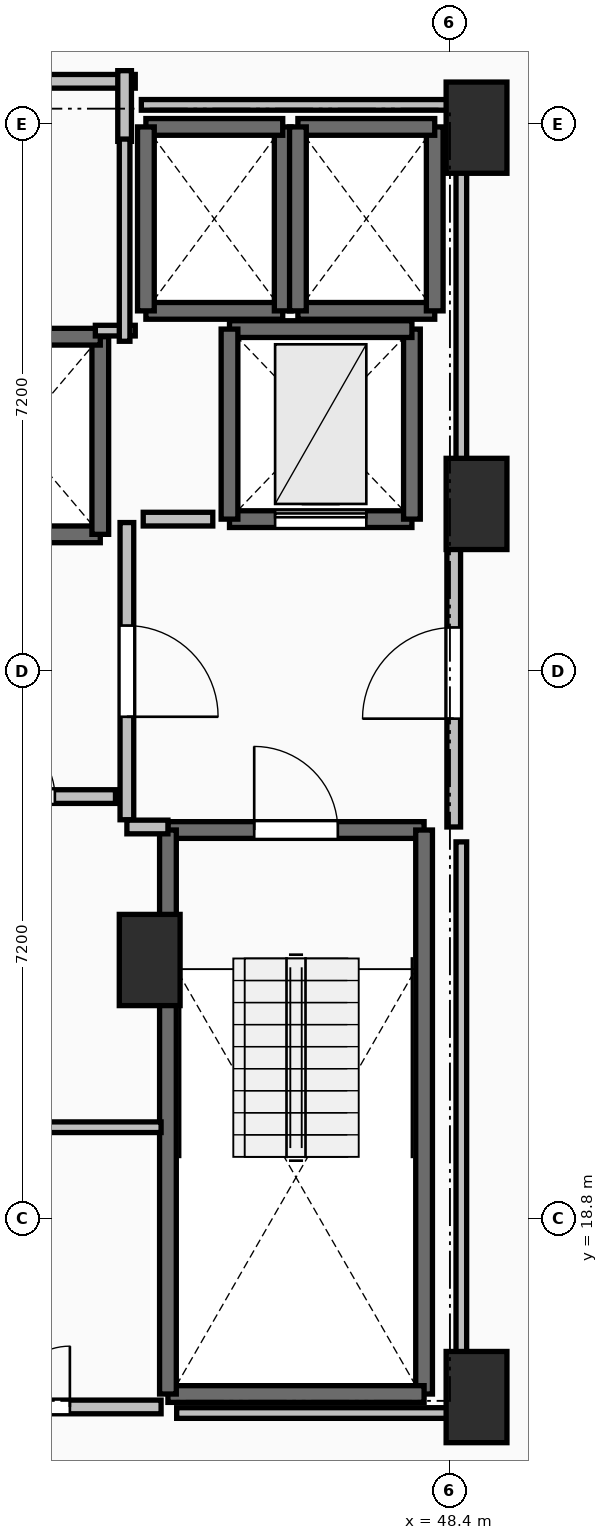
"""IFC4 building model, lengths in metres.
Left out: names, types, materials, properties, quantities, classifications, styles, units other than length and angle.
Written with IfcOpenShell. Run it as: python <this file> out.ifc"""

import sys

from ifc_helpers import new_model, si_unit, direction, frame, frame_2d, origin, origin_2d, place, context, subcontext, project, spatial, rectangle, extrude, element, fill, save


model = new_model("IFC4")
c1 = context("Model", 3, precision=1e-05, world=origin(), true_north=direction((0.0, 1.0)))
c2 = subcontext(c1, "Body", "Model", "MODEL_VIEW")
j1 = project(units=[si_unit("LENGTHUNIT", "METRE"), si_unit("PLANEANGLEUNIT", "RADIAN")], contexts=[c1])
p1 = place(None, origin())
s1 = spatial("IfcSite", under=j1, at=p1, CompositionType="ELEMENT")
p2 = place(p1, origin())
s2 = spatial("IfcBuilding", under=s1, at=p2, CompositionType="ELEMENT")
p3 = place(p2, frame((0.0, 0.0, 48.5)))
s3 = spatial("IfcBuildingStorey", under=s2, at=p3, CompositionType="ELEMENT", Elevation=48.5)
for number, where, z_axis, x_axis in (
    (1, (48.75, 33.15, 0.0), (0.0, 0.0, 1.0), (1.0, 0.0, 0.0)),
    (2, (48.75, 28.2, 0.0), (0.0, 0.0, 1.0), (1.0, 0.0, 0.0)),
    (3, (48.75, 16.45, 0.0), (0.0, 0.0, 1.0), (1.0, 0.0, 0.0)),
    (4, (44.45, 22.2, 0.0), (0.0, 0.0, 1.0), (1.0, 0.0, 0.0)),
):
    element("IfcColumn", number, at=place(p3, frame(where, z_axis=z_axis, x_axis=x_axis)), inside=s3, PredefinedType="PILASTER", context=c2, shape_type="SweptSolid", body=[
        extrude(rectangle(XDim=0.8, YDim=1.2, at=origin_2d()), origin(), (0.0, 0.0, 1.0), 3.5),
    ])
p4 = place(p3, frame((44.69, 23.91, 0.0), z_axis=(0.0, 0.0, 1.0), x_axis=(1.0, 0.0, 0.0)))
e5 = element("IfcWall", 5, at=p4, inside=s3, PredefinedType="SOLIDWALL", context=c2, shape_type="SweptSolid", body=[
    extrude(rectangle(XDim=3.37, YDim=0.22, at=frame_2d((1.685, 0.0))), origin(), (0.0, 0.0, 1.0), 3.24),
])
p5 = place(p4, frame((1.135, 0.0, 0.0)))
e6 = element("IfcOpeningElement", 6, at=p5, cuts=e5, PredefinedType="OPENING", context=c2, shape_type="SweptSolid", body=[
    extrude(rectangle(XDim=1.1, YDim=2.15, at=frame_2d((0.55, 1.075))), frame((0.0, 0.125, 0.0), z_axis=(0.0, -1.0, 0.0), x_axis=(1.0, 0.0, 0.0)), (0.0, 0.0, 1.0), 0.25),
])
p6 = place(p3, frame((48.06, 23.91, 0.0), z_axis=(0.0, 0.0, 1.0), x_axis=(0.0, -1.0, 0.0)))
e7 = element("IfcWall", 7, at=p6, inside=s3, PredefinedType="SOLIDWALL", context=c2, shape_type="SweptSolid", body=[
    extrude(rectangle(XDim=7.42, YDim=0.22, at=frame_2d((3.71, 0.0))), origin(), (0.0, 0.0, 1.0), 3.24),
])
p7 = place(p3, frame((48.06, 16.49, 0.0), z_axis=(0.0, 0.0, 1.0), x_axis=(-1.0, 0.0, 0.0)))
e8 = element("IfcWall", 8, at=p7, inside=s3, PredefinedType="SOLIDWALL", context=c2, shape_type="SweptSolid", body=[
    extrude(rectangle(XDim=3.37, YDim=0.22, at=frame_2d((1.685, 0.0))), origin(), (0.0, 0.0, 1.0), 3.24),
])
p8 = place(p3, frame((44.69, 16.49, 0.0), z_axis=(0.0, 0.0, 1.0), x_axis=(0.0, 1.0, 0.0)))
e9 = element("IfcWall", 9, at=p8, inside=s3, PredefinedType="SOLIDWALL", context=c2, shape_type="SweptSolid", body=[
    extrude(rectangle(XDim=7.42, YDim=0.22, at=frame_2d((3.71, 0.0))), origin(), (0.0, 0.0, 1.0), 3.24),
])
p9 = place(p3, frame((41.6, 27.8, 0.0), z_axis=(0.0, 0.0, 1.0), x_axis=(1.0, 0.0, 0.0)))
e10 = element("IfcWall", 10, at=p9, inside=s3, PredefinedType="SOLIDWALL", context=c2, shape_type="SweptSolid", body=[
    extrude(rectangle(XDim=2.2, YDim=0.22, at=frame_2d((1.1, 0.0))), origin(), (0.0, 0.0, 1.0), 3.24),
])
p10 = place(p3, frame((43.8, 27.8, 0.0), z_axis=(0.0, 0.0, 1.0), x_axis=(0.0, 1.0, 0.0)))
e11 = element("IfcWall", 11, at=p10, inside=s3, PredefinedType="SOLIDWALL", context=c2, shape_type="SweptSolid", body=[
    extrude(rectangle(XDim=2.6, YDim=0.22, at=frame_2d((1.3, 0.0))), origin(), (0.0, 0.0, 1.0), 3.24),
])
p11 = place(p3, frame((43.8, 30.4, 0.0), z_axis=(0.0, 0.0, 1.0), x_axis=(-1.0, 0.0, 0.0)))
e12 = element("IfcWall", 12, at=p11, inside=s3, PredefinedType="SOLIDWALL", context=c2, shape_type="SweptSolid", body=[
    extrude(rectangle(XDim=2.2, YDim=0.22, at=frame_2d((1.1, 0.0))), origin(), (0.0, 0.0, 1.0), 3.24),
])
p12 = place(p3, frame((44.4, 30.74, 0.0), z_axis=(0.0, 0.0, 1.0), x_axis=(1.0, 0.0, 0.0)))
e13 = element("IfcWall", 13, at=p12, inside=s3, PredefinedType="SOLIDWALL", context=c2, shape_type="SweptSolid", body=[
    extrude(rectangle(XDim=1.8, YDim=0.22, at=frame_2d((0.9, 0.0))), origin(), (0.0, 0.0, 1.0), 3.24),
])
p13 = place(p3, frame((46.2, 30.74, 0.0), z_axis=(0.0, 0.0, 1.0), x_axis=(0.0, 1.0, 0.0)))
e14 = element("IfcWall", 14, at=p13, inside=s3, PredefinedType="SOLIDWALL", context=c2, shape_type="SweptSolid", body=[
    extrude(rectangle(XDim=2.42, YDim=0.22, at=frame_2d((1.21, 0.0))), origin(), (0.0, 0.0, 1.0), 3.24),
])
p14 = place(p3, frame((46.2, 33.16, 0.0), z_axis=(0.0, 0.0, 1.0), x_axis=(-1.0, 0.0, 0.0)))
e15 = element("IfcWall", 15, at=p14, inside=s3, PredefinedType="SOLIDWALL", context=c2, shape_type="SweptSolid", body=[
    extrude(rectangle(XDim=1.8, YDim=0.22, at=frame_2d((0.9, 0.0))), origin(), (0.0, 0.0, 1.0), 3.24),
])
p15 = place(p3, frame((44.4, 33.16, 0.0), z_axis=(0.0, 0.0, 1.0), x_axis=(0.0, -1.0, 0.0)))
e16 = element("IfcWall", 16, at=p15, inside=s3, PredefinedType="SOLIDWALL", context=c2, shape_type="SweptSolid", body=[
    extrude(rectangle(XDim=2.42, YDim=0.22, at=frame_2d((1.21, 0.0))), origin(), (0.0, 0.0, 1.0), 3.24),
])
p16 = place(p3, frame((46.4, 30.74, 0.0), z_axis=(0.0, 0.0, 1.0), x_axis=(1.0, 0.0, 0.0)))
e17 = element("IfcWall", 17, at=p16, inside=s3, PredefinedType="SOLIDWALL", context=c2, shape_type="SweptSolid", body=[
    extrude(rectangle(XDim=1.8, YDim=0.22, at=frame_2d((0.9, 0.0))), origin(), (0.0, 0.0, 1.0), 3.24),
])
p17 = place(p3, frame((48.2, 30.74, 0.0), z_axis=(0.0, 0.0, 1.0), x_axis=(0.0, 1.0, 0.0)))
e18 = element("IfcWall", 18, at=p17, inside=s3, PredefinedType="SOLIDWALL", context=c2, shape_type="SweptSolid", body=[
    extrude(rectangle(XDim=2.42, YDim=0.22, at=frame_2d((1.21, 0.0))), origin(), (0.0, 0.0, 1.0), 3.24),
])
p18 = place(p3, frame((48.2, 33.16, 0.0), z_axis=(0.0, 0.0, 1.0), x_axis=(-1.0, 0.0, 0.0)))
e19 = element("IfcWall", 19, at=p18, inside=s3, PredefinedType="SOLIDWALL", context=c2, shape_type="SweptSolid", body=[
    extrude(rectangle(XDim=1.8, YDim=0.22, at=frame_2d((0.9, 0.0))), origin(), (0.0, 0.0, 1.0), 3.24),
])
p19 = place(p3, frame((46.4, 33.16, 0.0), z_axis=(0.0, 0.0, 1.0), x_axis=(0.0, -1.0, 0.0)))
e20 = element("IfcWall", 20, at=p19, inside=s3, PredefinedType="SOLIDWALL", context=c2, shape_type="SweptSolid", body=[
    extrude(rectangle(XDim=2.42, YDim=0.22, at=frame_2d((1.21, 0.0))), origin(), (0.0, 0.0, 1.0), 3.24),
])
p20 = place(p3, frame((45.5, 28.0, 0.0), z_axis=(0.0, 0.0, 1.0), x_axis=(1.0, 0.0, 0.0)))
e21 = element("IfcWall", 21, at=p20, inside=s3, PredefinedType="SHEAR", context=c2, shape_type="SweptSolid", body=[
    extrude(rectangle(XDim=2.4, YDim=0.22, at=frame_2d((1.2, 0.0))), origin(), (0.0, 0.0, 1.0), 3.24),
])
p21 = place(p20, frame((0.6, 0.0, 0.0)))
e22 = element("IfcOpeningElement", 22, at=p21, cuts=e21, PredefinedType="OPENING", context=c2, shape_type="SweptSolid", body=[
    extrude(rectangle(XDim=1.2, YDim=2.2, at=frame_2d((0.6, 1.1))), frame((0.0, 0.125, 0.0), z_axis=(0.0, -1.0, 0.0), x_axis=(1.0, 0.0, 0.0)), (0.0, 0.0, 1.0), 0.25),
])
p22 = place(p3, frame((47.9, 28.0, 0.0), z_axis=(0.0, 0.0, 1.0), x_axis=(0.0, 1.0, 0.0)))
e23 = element("IfcWall", 23, at=p22, inside=s3, PredefinedType="SHEAR", context=c2, shape_type="SweptSolid", body=[
    extrude(rectangle(XDim=2.5, YDim=0.22, at=frame_2d((1.25, 0.0))), origin(), (0.0, 0.0, 1.0), 3.24),
])
p23 = place(p3, frame((47.9, 30.5, 0.0), z_axis=(0.0, 0.0, 1.0), x_axis=(-1.0, 0.0, 0.0)))
e24 = element("IfcWall", 24, at=p23, inside=s3, PredefinedType="SHEAR", context=c2, shape_type="SweptSolid", body=[
    extrude(rectangle(XDim=2.4, YDim=0.22, at=frame_2d((1.2, 0.0))), origin(), (0.0, 0.0, 1.0), 3.24),
])
p24 = place(p3, frame((45.5, 30.5, 0.0), z_axis=(0.0, 0.0, 1.0), x_axis=(0.0, -1.0, 0.0)))
e25 = element("IfcWall", 25, at=p24, inside=s3, PredefinedType="SHEAR", context=c2, shape_type="SweptSolid", body=[
    extrude(rectangle(XDim=2.5, YDim=0.22, at=frame_2d((1.25, 0.0))), origin(), (0.0, 0.0, 1.0), 3.24),
])
p25 = place(p3, frame((44.15, 27.955, 0.0), z_axis=(0.0, 0.0, 1.0), x_axis=(0.0, -1.0, 0.0)))
e26 = element("IfcWall", 26, at=p25, inside=s3, PredefinedType="PARTITIONING", context=c2, shape_type="SweptSolid", body=[
    extrude(rectangle(XDim=3.91, YDim=0.18, at=frame_2d((1.955, 0.0))), origin(), (0.0, 0.0, 1.0), 3.24),
])
p26 = place(p25, frame((1.355, 0.0, 0.0)))
e27 = element("IfcOpeningElement", 27, at=p26, cuts=e26, PredefinedType="OPENING", context=c2, shape_type="SweptSolid", body=[
    extrude(rectangle(XDim=1.2, YDim=2.15, at=frame_2d((0.6, 1.075))), frame((0.0, 0.105, 0.0), z_axis=(0.0, -1.0, 0.0), x_axis=(1.0, 0.0, 0.0)), (0.0, 0.0, 1.0), 0.21),
])
p27 = place(p3, frame((44.15, 23.95, 0.0), z_axis=(0.0, 0.0, 1.0), x_axis=(1.0, 0.0, 0.0)))
e28 = element("IfcWall", 28, at=p27, inside=s3, PredefinedType="PARTITIONING", context=c2, shape_type="SweptSolid", body=[
    extrude(rectangle(XDim=0.54, YDim=0.18, at=frame_2d((0.27, 0.0))), origin(), (0.0, 0.0, 1.0), 3.24),
])
p28 = place(p3, frame((48.45, 23.95, 0.0), z_axis=(0.0, 0.0, 1.0), x_axis=(0.0, 1.0, 0.0)))
e29 = element("IfcWall", 29, at=p28, inside=s3, PredefinedType="PARTITIONING", context=c2, shape_type="SweptSolid", body=[
    extrude(rectangle(XDim=4.05, YDim=0.18, at=frame_2d((2.025, 0.0))), origin(), (0.0, 0.0, 1.0), 3.24),
])
p29 = place(p28, frame((1.425, 0.0, 0.0)))
e30 = element("IfcOpeningElement", 30, at=p29, cuts=e29, PredefinedType="OPENING", context=c2, shape_type="SweptSolid", body=[
    extrude(rectangle(XDim=1.2, YDim=2.15, at=frame_2d((0.6, 1.075))), frame((0.0, 0.105, 0.0), z_axis=(0.0, -1.0, 0.0), x_axis=(1.0, 0.0, 0.0)), (0.0, 0.0, 1.0), 0.21),
])
p30 = place(p3, frame((41.555, 24.35, 0.0), z_axis=(0.0, 0.0, 1.0), x_axis=(1.0, 0.0, 0.0)))
e31 = element("IfcWall", 31, at=p30, inside=s3, PredefinedType="PARTITIONING", context=c2, shape_type="SweptSolid", body=[
    extrude(rectangle(XDim=2.445, YDim=0.18, at=frame_2d((1.223, 0.0))), origin(), (0.0, 0.0, 1.0), 3.24),
])
p31 = place(p30, frame((0.798, 0.0, 0.0)))
e32 = element("IfcOpeningElement", 32, at=p31, cuts=e31, PredefinedType="OPENING", context=c2, shape_type="SweptSolid", body=[
    extrude(rectangle(XDim=0.85, YDim=2.1, at=frame_2d((0.425, 1.05))), frame((0.0, 0.105, 0.0), z_axis=(0.0, -1.0, 0.0), x_axis=(1.0, 0.0, 0.0)), (0.0, 0.0, 1.0), 0.21),
])
p32 = place(p3, frame((44.6, 20.0, 0.0), z_axis=(0.0, 0.0, 1.0), x_axis=(-1.0, 0.0, 0.0)))
e33 = element("IfcWall", 33, at=p32, inside=s3, PredefinedType="PARTITIONING", context=c2, shape_type="SweptSolid", body=[
    extrude(rectangle(XDim=3.2, YDim=0.14, at=frame_2d((1.6, 0.0))), origin(), (0.0, 0.0, 1.0), 3.24),
])
p33 = place(p3, frame((41.4, 16.32, 0.0), z_axis=(0.0, 0.0, 1.0), x_axis=(1.0, 0.0, 0.0)))
e34 = element("IfcWall", 34, at=p33, inside=s3, PredefinedType="PARTITIONING", context=c2, shape_type="SweptSolid", body=[
    extrude(rectangle(XDim=3.2, YDim=0.18, at=frame_2d((1.6, 0.0))), origin(), (0.0, 0.0, 1.0), 3.24),
])
p34 = place(p33, frame((1.2, 0.0, 0.0)))
e35 = element("IfcOpeningElement", 35, at=p34, cuts=e34, PredefinedType="OPENING", context=c2, shape_type="SweptSolid", body=[
    extrude(rectangle(XDim=0.8, YDim=2.05, at=frame_2d((0.4, 1.025))), frame((0.0, 0.105, 0.0), z_axis=(0.0, -1.0, 0.0), x_axis=(1.0, 0.0, 0.0)), (0.0, 0.0, 1.0), 0.21),
])
p35 = place(p3, frame((44.26, 33.76, 0.0), z_axis=(0.0, 0.0, 1.0), x_axis=(-1.0, 0.0, 0.0)))
e36 = element("IfcWall", 36, at=p35, inside=s3, PredefinedType="PARTITIONING", context=c2, shape_type="SweptSolid", body=[
    extrude(rectangle(XDim=4.61, YDim=0.18, at=frame_2d((2.305, 0.0))), origin(), (0.0, 0.0, 1.0), 3.24),
])
p36 = place(p35, frame((1.88, 0.0, 0.0)))
e37 = element("IfcOpeningElement", 37, at=p36, cuts=e36, PredefinedType="OPENING", context=c2, shape_type="SweptSolid", body=[
    extrude(rectangle(XDim=0.85, YDim=2.1, at=frame_2d((0.425, 1.05))), frame((0.0, 0.105, 0.0), z_axis=(0.0, -1.0, 0.0), x_axis=(1.0, 0.0, 0.0)), (0.0, 0.0, 1.0), 0.21),
])
p37 = place(p3, frame((44.12, 32.97, 0.0), z_axis=(0.0, 0.0, 1.0), x_axis=(0.0, 1.0, 0.0)))
e38 = element("IfcWall", 38, at=p37, inside=s3, PredefinedType="PARTITIONING", context=c2, shape_type="SweptSolid", body=[
    extrude(rectangle(XDim=0.93, YDim=0.18, at=frame_2d((0.465, 0.0))), origin(), (0.0, 0.0, 1.0), 3.24),
])
p38 = place(p3, frame((45.28, 28.0, 0.0), z_axis=(0.0, 0.0, 1.0), x_axis=(-1.0, 0.0, 0.0)))
e39 = element("IfcWall", 39, at=p38, inside=s3, PredefinedType="PARTITIONING", context=c2, shape_type="SweptSolid", body=[
    extrude(rectangle(XDim=0.915, YDim=0.18, at=frame_2d((0.458, 0.0))), origin(), (0.0, 0.0, 1.0), 3.24),
])
p39 = place(p3, frame((43.735, 30.48, 0.0), z_axis=(0.0, 0.0, 1.0), x_axis=(1.0, 0.0, 0.0)))
e40 = element("IfcWall", 40, at=p39, inside=s3, PredefinedType="PARTITIONING", context=c2, shape_type="SweptSolid", body=[
    extrude(rectangle(XDim=0.525, YDim=0.14, at=frame_2d((0.262, 0.0))), origin(), (0.0, 0.0, 1.0), 3.24),
])
p40 = place(p3, frame((44.12, 30.34, 0.0), z_axis=(0.0, 0.0, 1.0), x_axis=(0.0, 1.0, 0.0)))
e41 = element("IfcWall", 41, at=p40, inside=s3, PredefinedType="PARTITIONING", context=c2, shape_type="SweptSolid", body=[
    extrude(rectangle(XDim=2.66, YDim=0.14, at=frame_2d((1.33, 0.0))), origin(), (0.0, 0.0, 1.0), 3.24),
])
p41 = place(p3, frame((44.34, 33.45, 0.0), z_axis=(0.0, 0.0, 1.0), x_axis=(1.0, 0.0, 0.0)))
e42 = element("IfcWall", 42, at=p41, inside=s3, PredefinedType="PARTITIONING", context=c2, shape_type="SweptSolid", body=[
    extrude(rectangle(XDim=4.21, YDim=0.14, at=frame_2d((2.105, 0.0))), origin(), (0.0, 0.0, 1.0), 2.432),
])
p42 = place(p3, frame((48.55, 33.45, 0.0), z_axis=(0.0, 0.0, 1.0), x_axis=(0.0, -1.0, 0.0)))
e43 = element("IfcWall", 43, at=p42, inside=s3, PredefinedType="PARTITIONING", context=c2, shape_type="SweptSolid", body=[
    extrude(rectangle(XDim=5.254, YDim=0.14, at=frame_2d((2.627, 0.0))), origin(), (0.0, 0.0, 1.0), 2.432),
])
p43 = place(p3, frame((48.55, 23.754, 0.0), z_axis=(0.0, 0.0, 1.0), x_axis=(0.0, -1.0, 0.0)))
e44 = element("IfcWall", 44, at=p43, inside=s3, PredefinedType="PARTITIONING", context=c2, shape_type="SweptSolid", body=[
    extrude(rectangle(XDim=7.514, YDim=0.14, at=frame_2d((3.757, 0.0))), origin(), (0.0, 0.0, 1.0), 2.432),
])
p44 = place(p3, frame((48.55, 16.24, 0.0), z_axis=(0.0, 0.0, 1.0), x_axis=(-1.0, 0.0, 0.0)))
e45 = element("IfcWall", 45, at=p44, inside=s3, PredefinedType="PARTITIONING", context=c2, shape_type="SweptSolid", body=[
    extrude(rectangle(XDim=3.745, YDim=0.14, at=frame_2d((1.873, 0.0))), origin(), (0.0, 0.0, 1.0), 2.432),
])
p45 = place(p5, origin())
e46 = element("IfcDoor", 46, at=p45, inside=s3, OperationType="SINGLE_SWING_LEFT", PredefinedType="DOOR", context=c2, shape_type="SweptSolid", body=[
    extrude(rectangle(XDim=1.1, YDim=2.15, at=frame_2d((0.55, 1.075))), frame((0.0, 0.025, 0.0), z_axis=(0.0, -1.0, 0.0), x_axis=(1.0, 0.0, 0.0)), (0.0, 0.0, 1.0), 0.05),
])
fill(e6, e46)
p46 = place(p21, origin())
e47 = element("IfcDoor", 47, at=p46, inside=s3, OperationType="SLIDING_TO_LEFT", PredefinedType="DOOR", context=c2, shape_type="SweptSolid", body=[
    extrude(rectangle(XDim=1.2, YDim=2.2, at=frame_2d((0.6, 1.1))), frame((0.0, 0.025, 0.0), z_axis=(0.0, -1.0, 0.0), x_axis=(1.0, 0.0, 0.0)), (0.0, 0.0, 1.0), 0.05),
])
fill(e22, e47)
p47 = place(p26, origin())
e48 = element("IfcDoor", 48, at=p47, inside=s3, OperationType="SINGLE_SWING_RIGHT", PredefinedType="DOOR", context=c2, shape_type="SweptSolid", body=[
    extrude(rectangle(XDim=1.2, YDim=2.15, at=frame_2d((0.6, 1.075))), frame((0.0, 0.025, 0.0), z_axis=(0.0, -1.0, 0.0), x_axis=(1.0, 0.0, 0.0)), (0.0, 0.0, 1.0), 0.05),
])
fill(e27, e48)
p48 = place(p29, origin())
e49 = element("IfcDoor", 49, at=p48, inside=s3, OperationType="SINGLE_SWING_LEFT", PredefinedType="DOOR", context=c2, shape_type="SweptSolid", body=[
    extrude(rectangle(XDim=1.2, YDim=2.15, at=frame_2d((0.6, 1.075))), frame((0.0, 0.025, 0.0), z_axis=(0.0, -1.0, 0.0), x_axis=(1.0, 0.0, 0.0)), (0.0, 0.0, 1.0), 0.05),
])
fill(e30, e49)
p49 = place(p31, origin())
e50 = element("IfcDoor", 50, at=p49, inside=s3, OperationType="SINGLE_SWING_LEFT", PredefinedType="DOOR", context=c2, shape_type="SweptSolid", body=[
    extrude(rectangle(XDim=0.85, YDim=2.1, at=frame_2d((0.425, 1.05))), frame((0.0, 0.025, 0.0), z_axis=(0.0, -1.0, 0.0), x_axis=(1.0, 0.0, 0.0)), (0.0, 0.0, 1.0), 0.05),
])
fill(e32, e50)
p50 = place(p34, origin())
e51 = element("IfcDoor", 51, at=p50, inside=s3, OperationType="SINGLE_SWING_RIGHT", PredefinedType="DOOR", context=c2, shape_type="SweptSolid", body=[
    extrude(rectangle(XDim=0.8, YDim=2.05, at=frame_2d((0.4, 1.025))), frame((0.0, 0.025, 0.0), z_axis=(0.0, -1.0, 0.0), x_axis=(1.0, 0.0, 0.0)), (0.0, 0.0, 1.0), 0.05),
])
fill(e35, e51)
save(model, sys.argv[1])
